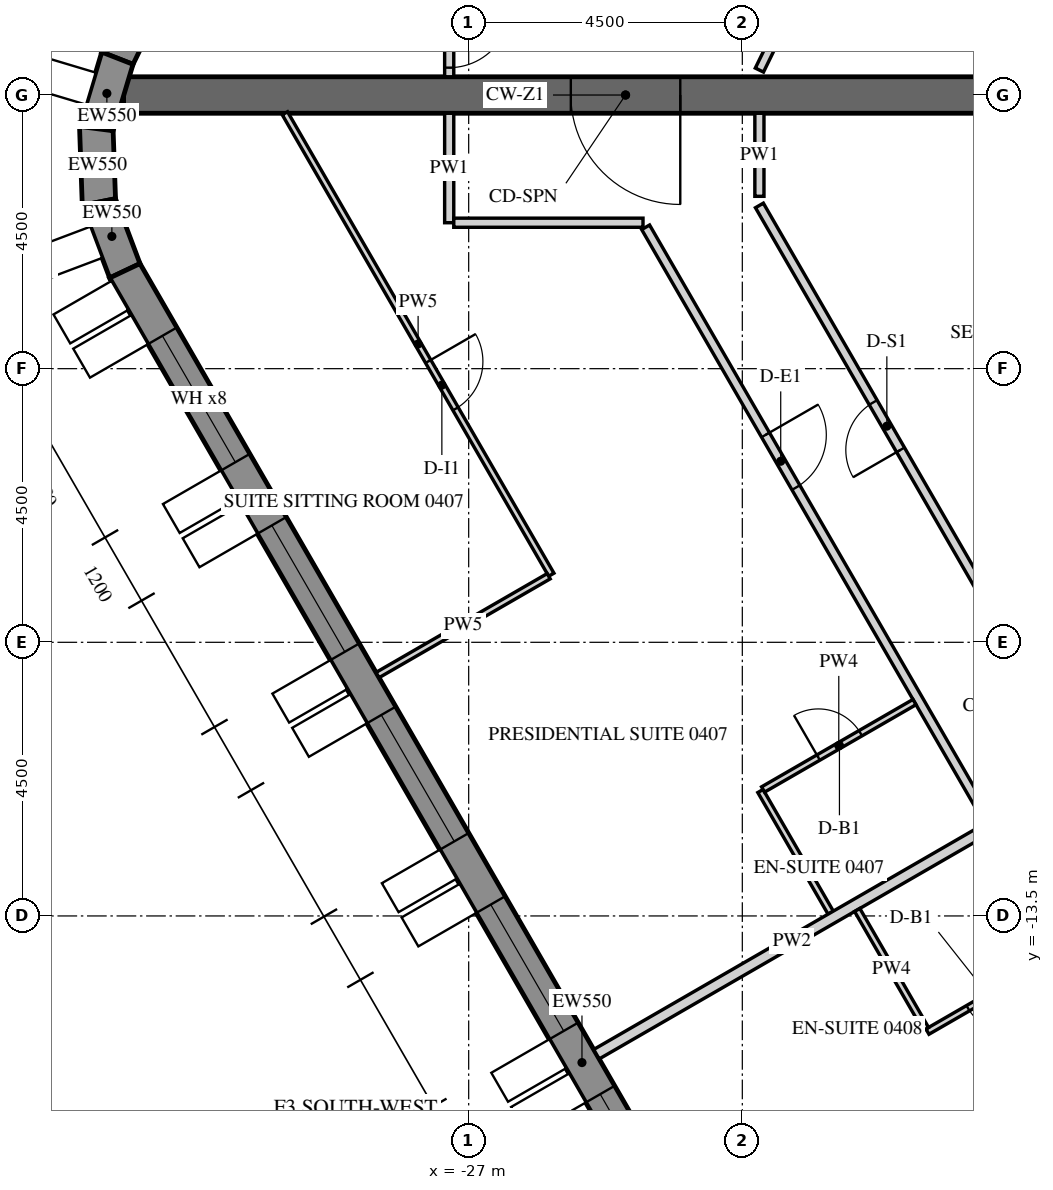
"""IFC4 building model, lengths in metres.
Left out: names, types, materials, properties, quantities, classifications, styles, units other than length and angle.
Written with IfcOpenShell. Run it as: python <this file> out.ifc"""

import sys

from ifc_helpers import new_model, si_unit, direction, frame, frame_2d, origin, place, context, subcontext, project, spatial, polyline, rectangle, outline, extrude, element, fill, save


model = new_model("IFC4")
c1 = context("Model", 3, precision=1e-05, world=origin(), true_north=direction((0.0, 1.0)))
c2 = subcontext(c1, "Body", "Model", "MODEL_VIEW")
j1 = project(units=[si_unit("LENGTHUNIT", "METRE"), si_unit("PLANEANGLEUNIT", "RADIAN")], contexts=[c1])
p1 = place(None, origin())
s1 = spatial("IfcSite", under=j1, at=p1, CompositionType="ELEMENT")
p2 = place(p1, origin())
s2 = spatial("IfcBuilding", under=s1, at=p2, CompositionType="ELEMENT")
p3 = place(p2, frame((0.0, 0.0, 68.7)))
s3 = spatial("IfcBuildingStorey", under=s2, at=p3, CompositionType="ELEMENT", Elevation=68.7)
p4 = place(p3, frame((-19.595, 27.633, -0.15), z_axis=(0.0, 0.0, 1.0), x_axis=(-0.438368285794, -0.898795441694, 0.0)))
e1 = element("IfcWall", 1, at=p4, inside=s3, PredefinedType="SOLIDWALL", context=c2, shape_type="SweptSolid", body=[
    extrude(outline(polyline([(-0.026, -0.275), (30.093, -0.275), (30.048, 0.275), (0.026, 0.275), (-0.026, -0.275)])), origin(), (0.0, 0.0, 1.0), 3.9),
])
p5 = place(p4, frame((1.236, 0.0, 1.05)))
e2 = element("IfcOpeningElement", 2, at=p5, cuts=e1, PredefinedType="OPENING", context=c2, shape_type="SweptSolid", body=[
    extrude(rectangle(XDim=2.4, YDim=2.4, at=frame_2d((1.2, 1.2))), frame((0.0, 0.285, 0.0), z_axis=(0.0, -1.0, 0.0), x_axis=(1.0, 0.0, 0.0)), (0.0, 0.0, 1.0), 0.57),
])
p6 = place(p4, frame((4.835, 0.0, 1.05)))
e3 = element("IfcOpeningElement", 3, at=p6, cuts=e1, PredefinedType="OPENING", context=c2, shape_type="SweptSolid", body=[
    extrude(rectangle(XDim=2.4, YDim=2.4, at=frame_2d((1.2, 1.2))), frame((0.0, 0.285, 0.0), z_axis=(0.0, -1.0, 0.0), x_axis=(1.0, 0.0, 0.0)), (0.0, 0.0, 1.0), 0.57),
])
p7 = place(p4, frame((8.436, 0.0, 1.05)))
e4 = element("IfcOpeningElement", 4, at=p7, cuts=e1, PredefinedType="OPENING", context=c2, shape_type="SweptSolid", body=[
    extrude(rectangle(XDim=2.4, YDim=2.4, at=frame_2d((1.2, 1.2))), frame((0.0, 0.285, 0.0), z_axis=(0.0, -1.0, 0.0), x_axis=(1.0, 0.0, 0.0)), (0.0, 0.0, 1.0), 0.57),
])
p8 = place(p4, frame((12.035, 0.0, 1.05)))
e5 = element("IfcOpeningElement", 5, at=p8, cuts=e1, PredefinedType="OPENING", context=c2, shape_type="SweptSolid", body=[
    extrude(rectangle(XDim=2.4, YDim=2.4, at=frame_2d((1.2, 1.2))), frame((0.0, 0.285, 0.0), z_axis=(0.0, -1.0, 0.0), x_axis=(1.0, 0.0, 0.0)), (0.0, 0.0, 1.0), 0.57),
])
p9 = place(p4, frame((15.635, 0.0, 1.05)))
e6 = element("IfcOpeningElement", 6, at=p9, cuts=e1, PredefinedType="OPENING", context=c2, shape_type="SweptSolid", body=[
    extrude(rectangle(XDim=2.4, YDim=2.4, at=frame_2d((1.2, 1.2))), frame((0.0, 0.285, 0.0), z_axis=(0.0, -1.0, 0.0), x_axis=(1.0, 0.0, 0.0)), (0.0, 0.0, 1.0), 0.57),
])
p10 = place(p4, frame((19.236, 0.0, 1.05)))
e7 = element("IfcOpeningElement", 7, at=p10, cuts=e1, PredefinedType="OPENING", context=c2, shape_type="SweptSolid", body=[
    extrude(rectangle(XDim=2.4, YDim=2.4, at=frame_2d((1.2, 1.2))), frame((0.0, 0.285, 0.0), z_axis=(0.0, -1.0, 0.0), x_axis=(1.0, 0.0, 0.0)), (0.0, 0.0, 1.0), 0.57),
])
p11 = place(p4, frame((22.835, 0.0, 1.05)))
e8 = element("IfcOpeningElement", 8, at=p11, cuts=e1, PredefinedType="OPENING", context=c2, shape_type="SweptSolid", body=[
    extrude(rectangle(XDim=2.4, YDim=2.4, at=frame_2d((1.2, 1.2))), frame((0.0, 0.285, 0.0), z_axis=(0.0, -1.0, 0.0), x_axis=(1.0, 0.0, 0.0)), (0.0, 0.0, 1.0), 0.57),
])
p12 = place(p4, frame((26.436, 0.0, 1.05)))
e9 = element("IfcOpeningElement", 9, at=p12, cuts=e1, PredefinedType="OPENING", context=c2, shape_type="SweptSolid", body=[
    extrude(rectangle(XDim=2.4, YDim=2.4, at=frame_2d((1.2, 1.2))), frame((0.0, 0.285, 0.0), z_axis=(0.0, -1.0, 0.0), x_axis=(1.0, 0.0, 0.0)), (0.0, 0.0, 1.0), 0.57),
])
p13 = place(p3, frame((-32.777, 0.605, -0.15), z_axis=(0.0, 0.0, 1.0), x_axis=(-0.286921497463, -0.957954098219, 0.0)))
e10 = element("IfcWall", 10, at=p13, inside=s3, PredefinedType="SOLIDWALL", context=c2, shape_type="SweptSolid", body=[
    extrude(outline(polyline([(-0.022, -0.275), (1.253, -0.275), (1.163, 0.275), (0.022, 0.275), (-0.022, -0.275)])), origin(), (0.0, 0.0, 1.0), 3.9),
])
p14 = place(p3, frame((-33.124, -0.552, -0.15), z_axis=(0.0, 0.0, 1.0), x_axis=(0.03495638276, -0.999388838893, 0.0)))
e11 = element("IfcWall", 11, at=p14, inside=s3, PredefinedType="SOLIDWALL", context=c2, shape_type="SweptSolid", body=[
    extrude(outline(polyline([(-0.045, -0.275), (1.253, -0.275), (1.163, 0.275), (0.045, 0.275), (-0.045, -0.275)])), origin(), (0.0, 0.0, 1.0), 3.9),
])
p15 = place(p3, frame((-33.081, -1.76, -0.15), z_axis=(0.0, 0.0, 1.0), x_axis=(0.353027214741, -0.935613053378, 0.0)))
e12 = element("IfcWall", 12, at=p15, inside=s3, PredefinedType="SOLIDWALL", context=c2, shape_type="SweptSolid", body=[
    extrude(outline(polyline([(-0.045, -0.275), (1.231, -0.275), (1.186, 0.275), (0.045, 0.275), (-0.045, -0.275)])), origin(), (0.0, 0.0, 1.0), 3.9),
])
p16 = place(p3, frame((-32.655, -2.89, -0.15), z_axis=(0.0, 0.0, 1.0), x_axis=(0.499997711317, -0.866026725152, 0.0)))
e13 = element("IfcWall", 13, at=p16, inside=s3, PredefinedType="SOLIDWALL", context=c2, shape_type="SweptSolid", body=[
    extrude(outline(polyline([(-0.022, -0.275), (30.097, -0.275), (30.045, 0.275), (0.022, 0.275), (-0.022, -0.275)])), origin(), (0.0, 0.0, 1.0), 3.9),
])
p17 = place(p16, frame((1.236, 0.0, 1.05)))
e14 = element("IfcOpeningElement", 14, at=p17, cuts=e13, PredefinedType="OPENING", context=c2, shape_type="SweptSolid", body=[
    extrude(rectangle(XDim=2.4, YDim=2.4, at=frame_2d((1.2, 1.2))), frame((0.0, 0.285, 0.0), z_axis=(0.0, -1.0, 0.0), x_axis=(1.0, 0.0, 0.0)), (0.0, 0.0, 1.0), 0.57),
])
p18 = place(p16, frame((4.835, 0.0, 1.05)))
e15 = element("IfcOpeningElement", 15, at=p18, cuts=e13, PredefinedType="OPENING", context=c2, shape_type="SweptSolid", body=[
    extrude(rectangle(XDim=2.4, YDim=2.4, at=frame_2d((1.2, 1.2))), frame((0.0, 0.285, 0.0), z_axis=(0.0, -1.0, 0.0), x_axis=(1.0, 0.0, 0.0)), (0.0, 0.0, 1.0), 0.57),
])
p19 = place(p16, frame((8.436, 0.0, 1.05)))
e16 = element("IfcOpeningElement", 16, at=p19, cuts=e13, PredefinedType="OPENING", context=c2, shape_type="SweptSolid", body=[
    extrude(rectangle(XDim=2.4, YDim=2.4, at=frame_2d((1.2, 1.2))), frame((0.0, 0.285, 0.0), z_axis=(0.0, -1.0, 0.0), x_axis=(1.0, 0.0, 0.0)), (0.0, 0.0, 1.0), 0.57),
])
p20 = place(p16, frame((12.035, 0.0, 1.05)))
e17 = element("IfcOpeningElement", 17, at=p20, cuts=e13, PredefinedType="OPENING", context=c2, shape_type="SweptSolid", body=[
    extrude(rectangle(XDim=2.4, YDim=2.4, at=frame_2d((1.2, 1.2))), frame((0.0, 0.285, 0.0), z_axis=(0.0, -1.0, 0.0), x_axis=(1.0, 0.0, 0.0)), (0.0, 0.0, 1.0), 0.57),
])
p21 = place(p16, frame((15.635, 0.0, 1.05)))
e18 = element("IfcOpeningElement", 18, at=p21, cuts=e13, PredefinedType="OPENING", context=c2, shape_type="SweptSolid", body=[
    extrude(rectangle(XDim=2.4, YDim=2.4, at=frame_2d((1.2, 1.2))), frame((0.0, 0.285, 0.0), z_axis=(0.0, -1.0, 0.0), x_axis=(1.0, 0.0, 0.0)), (0.0, 0.0, 1.0), 0.57),
])
p22 = place(p16, frame((19.236, 0.0, 1.05)))
e19 = element("IfcOpeningElement", 19, at=p22, cuts=e13, PredefinedType="OPENING", context=c2, shape_type="SweptSolid", body=[
    extrude(rectangle(XDim=2.4, YDim=2.4, at=frame_2d((1.2, 1.2))), frame((0.0, 0.285, 0.0), z_axis=(0.0, -1.0, 0.0), x_axis=(1.0, 0.0, 0.0)), (0.0, 0.0, 1.0), 0.57),
])
p23 = place(p16, frame((22.835, 0.0, 1.05)))
e20 = element("IfcOpeningElement", 20, at=p23, cuts=e13, PredefinedType="OPENING", context=c2, shape_type="SweptSolid", body=[
    extrude(rectangle(XDim=2.4, YDim=2.4, at=frame_2d((1.2, 1.2))), frame((0.0, 0.285, 0.0), z_axis=(0.0, -1.0, 0.0), x_axis=(1.0, 0.0, 0.0)), (0.0, 0.0, 1.0), 0.57),
])
p24 = place(p16, frame((26.436, 0.0, 1.05)))
e21 = element("IfcOpeningElement", 21, at=p24, cuts=e13, PredefinedType="OPENING", context=c2, shape_type="SweptSolid", body=[
    extrude(rectangle(XDim=2.4, YDim=2.4, at=frame_2d((1.2, 1.2))), frame((0.0, 0.285, 0.0), z_axis=(0.0, -1.0, 0.0), x_axis=(1.0, 0.0, 0.0)), (0.0, 0.0, 1.0), 0.57),
])
p25 = place(p3, frame((-16.166, 0.0, -0.15), z_axis=(0.0, 0.0, 1.0), x_axis=(-1.0, 0.0, 0.0)))
e22 = element("IfcWall", 22, at=p25, inside=s3, PredefinedType="SHEAR", context=c2, shape_type="SweptSolid", body=[
    extrude(rectangle(XDim=16.509, YDim=0.6, at=frame_2d((8.254, 0.0))), origin(), (0.0, 0.0, 1.0), 3.9),
])
p26 = place(p25, frame((7.354, 0.0, 0.15)))
e23 = element("IfcOpeningElement", 23, at=p26, cuts=e22, PredefinedType="OPENING", context=c2, shape_type="SweptSolid", body=[
    extrude(rectangle(XDim=1.8, YDim=2.4, at=frame_2d((0.9, 1.2))), frame((0.0, 0.31, 0.0), z_axis=(0.0, -1.0, 0.0), x_axis=(1.0, 0.0, 0.0)), (0.0, 0.0, 1.0), 0.62),
])
p27 = place(p3, frame((-27.32, 2.025, 0.0), z_axis=(0.0, 0.0, 1.0), x_axis=(0.0, -1.0, 0.0)))
e24 = element("IfcWall", 24, at=p27, inside=s3, PredefinedType="PARTITIONING", context=c2, shape_type="SweptSolid", body=[
    extrude(rectangle(XDim=1.725, YDim=0.15, at=frame_2d((0.862, 0.0))), origin(), (0.0, 0.0, 1.0), 2.988),
])
p28 = place(p27, frame((0.575, 0.0, 0.0)))
e25 = element("IfcOpeningElement", 25, at=p28, cuts=e24, PredefinedType="OPENING", context=c2, shape_type="SweptSolid", body=[
    extrude(rectangle(XDim=1.0, YDim=2.1, at=frame_2d((0.5, 1.05))), frame((0.0, 0.085, 0.0), z_axis=(0.0, -1.0, 0.0), x_axis=(1.0, 0.0, 0.0)), (0.0, 0.0, 1.0), 0.17),
])
p29 = place(p3, frame((-22.219, 0.41, 0.0), z_axis=(0.0, 0.0, 1.0), x_axis=(0.438391891827, 0.898783927972, 0.0)))
e26 = element("IfcWall", 26, at=p29, inside=s3, PredefinedType="PARTITIONING", context=c2, shape_type="SweptSolid", body=[
    extrude(rectangle(XDim=9.699, YDim=0.15, at=frame_2d((4.85, 0.0))), origin(), (0.0, 0.0, 1.0), 2.988),
])
p30 = place(p29, frame((4.4, 0.0, 0.0)))
e27 = element("IfcOpeningElement", 27, at=p30, cuts=e26, PredefinedType="OPENING", context=c2, shape_type="SweptSolid", body=[
    extrude(rectangle(XDim=0.9, YDim=2.1, at=frame_2d((0.45, 1.05))), frame((0.0, 0.085, 0.0), z_axis=(0.0, -1.0, 0.0), x_axis=(1.0, 0.0, 0.0)), (0.0, 0.0, 1.0), 0.17),
])
p31 = place(p3, frame((-27.32, -0.3, 0.0), z_axis=(0.0, 0.0, 1.0), x_axis=(0.0, -1.0, 0.0)))
e28 = element("IfcWall", 28, at=p31, inside=s3, PredefinedType="PARTITIONING", context=c2, shape_type="SweptSolid", body=[
    extrude(rectangle(XDim=1.8, YDim=0.15, at=frame_2d((0.9, 0.0))), origin(), (0.0, 0.0, 1.0), 2.988),
])
p32 = place(p3, frame((-27.245, -2.1, 0.0), z_axis=(0.0, 0.0, 1.0), x_axis=(1.0, 0.0, 0.0)))
e29 = element("IfcWall", 29, at=p32, inside=s3, PredefinedType="PARTITIONING", context=c2, shape_type="SweptSolid", body=[
    extrude(rectangle(XDim=3.112, YDim=0.15, at=frame_2d((1.556, 0.0))), origin(), (0.0, 0.0, 1.0), 2.988),
])
p33 = place(p3, frame((-24.09, -2.175, 0.0), z_axis=(0.0, 0.0, 1.0), x_axis=(0.499996832073, -0.86602723278, 0.0)))
e30 = element("IfcWall", 30, at=p33, inside=s3, PredefinedType="PARTITIONING", context=c2, shape_type="SweptSolid", body=[
    extrude(rectangle(XDim=23.877, YDim=0.15, at=frame_2d((11.938, 0.0))), origin(), (0.0, 0.0, 1.0), 2.988),
])
p34 = place(p33, frame((3.943, 0.0, 0.0)))
e31 = element("IfcOpeningElement", 31, at=p34, cuts=e30, PredefinedType="OPENING", context=c2, shape_type="SweptSolid", body=[
    extrude(rectangle(XDim=1.0, YDim=2.1, at=frame_2d((0.5, 1.05))), frame((0.0, 0.085, 0.0), z_axis=(0.0, -1.0, 0.0), x_axis=(1.0, 0.0, 0.0)), (0.0, 0.0, 1.0), 0.17),
])
p35 = place(p33, frame((15.672, 0.0, 0.0)))
e32 = element("IfcOpeningElement", 32, at=p35, cuts=e30, PredefinedType="OPENING", context=c2, shape_type="SweptSolid", body=[
    extrude(rectangle(XDim=1.0, YDim=2.1, at=frame_2d((0.5, 1.05))), frame((0.0, 0.085, 0.0), z_axis=(0.0, -1.0, 0.0), x_axis=(1.0, 0.0, 0.0)), (0.0, 0.0, 1.0), 0.17),
])
p36 = place(p33, frame((19.525, 0.0, 0.0)))
e33 = element("IfcOpeningElement", 33, at=p36, cuts=e30, PredefinedType="OPENING", context=c2, shape_type="SweptSolid", body=[
    extrude(rectangle(XDim=1.0, YDim=2.1, at=frame_2d((0.5, 1.05))), frame((0.0, 0.085, 0.0), z_axis=(0.0, -1.0, 0.0), x_axis=(1.0, 0.0, 0.0)), (0.0, 0.0, 1.0), 0.17),
])
p37 = place(p3, frame((-18.027, -9.076, 0.0), z_axis=(0.0, 0.0, 1.0), x_axis=(-0.500007318041, 0.86602117867, 0.0)))
e34 = element("IfcWall", 34, at=p37, inside=s3, PredefinedType="PARTITIONING", context=c2, shape_type="SweptSolid", body=[
    extrude(rectangle(XDim=8.383, YDim=0.15, at=frame_2d((4.191, 0.0))), origin(), (0.0, 0.0, 1.0), 2.988),
])
p38 = place(p37, frame((3.742, 0.0, 0.0)))
e35 = element("IfcOpeningElement", 35, at=p38, cuts=e34, PredefinedType="OPENING", context=c2, shape_type="SweptSolid", body=[
    extrude(rectangle(XDim=0.9, YDim=2.1, at=frame_2d((0.45, 1.05))), frame((0.0, 0.085, 0.0), z_axis=(0.0, -1.0, 0.0), x_axis=(1.0, 0.0, 0.0)), (0.0, 0.0, 1.0), 0.17),
])
p39 = place(p3, frame((-22.219, -1.666, 0.0), z_axis=(0.0, 0.0, 1.0), x_axis=(0.0, 1.0, 0.0)))
e36 = element("IfcWall", 36, at=p39, inside=s3, PredefinedType="PARTITIONING", context=c2, shape_type="SweptSolid", body=[
    extrude(rectangle(XDim=1.366, YDim=0.15, at=frame_2d((0.683, 0.0))), origin(), (0.0, 0.0, 1.0), 2.988),
])
p40 = place(p3, frame((-21.047, -13.446, 0.0), z_axis=(0.0, 0.0, 1.0), x_axis=(-0.500015210774, 0.866016621662, 0.0)))
e37 = element("IfcWall", 37, at=p40, inside=s3, PredefinedType="PARTITIONING", context=c2, shape_type="SweptSolid", body=[
    extrude(rectangle(XDim=2.31, YDim=0.1, at=frame_2d((1.155, 0.0))), origin(), (0.0, 0.0, 1.0), 2.988),
])
p41 = place(p3, frame((-22.158, -11.42, 0.0), z_axis=(0.0, 0.0, 1.0), x_axis=(0.866018712932, 0.500011588718, 0.0)))
e38 = element("IfcWall", 38, at=p41, inside=s3, PredefinedType="PARTITIONING", context=c2, shape_type="SweptSolid", body=[
    extrude(rectangle(XDim=2.875, YDim=0.1, at=frame_2d((1.438, 0.0))), origin(), (0.0, 0.0, 1.0), 2.988),
])
p42 = place(p41, frame((1.05, 0.0, 0.0)))
e39 = element("IfcOpeningElement", 39, at=p42, cuts=e38, PredefinedType="OPENING", context=c2, shape_type="SweptSolid", body=[
    extrude(rectangle(XDim=0.8, YDim=2.1, at=frame_2d((0.4, 1.05))), frame((0.0, 0.06, 0.0), z_axis=(0.0, -1.0, 0.0), x_axis=(1.0, 0.0, 0.0)), (0.0, 0.0, 1.0), 0.12),
])
p43 = place(p3, frame((-30.022, -0.3, 0.0), z_axis=(0.0, 0.0, 1.0), x_axis=(0.499995798296, -0.866027829626, 0.0)))
e40 = element("IfcWall", 40, at=p43, inside=s3, PredefinedType="PARTITIONING", context=c2, shape_type="SweptSolid", body=[
    extrude(rectangle(XDim=8.762, YDim=0.1, at=frame_2d((4.381, 0.0))), origin(), (0.0, 0.0, 1.0), 2.988),
])
p44 = place(p43, frame((4.712, 0.0, 0.0)))
e41 = element("IfcOpeningElement", 41, at=p44, cuts=e40, PredefinedType="OPENING", context=c2, shape_type="SweptSolid", body=[
    extrude(rectangle(XDim=0.9, YDim=2.1, at=frame_2d((0.45, 1.05))), frame((0.0, 0.06, 0.0), z_axis=(0.0, -1.0, 0.0), x_axis=(1.0, 0.0, 0.0)), (0.0, 0.0, 1.0), 0.12),
])
p45 = place(p3, frame((-25.684, -7.913, 0.0), z_axis=(0.0, 0.0, 1.0), x_axis=(-0.866034226713, -0.499984717929, 0.0)))
e42 = element("IfcWall", 42, at=p45, inside=s3, PredefinedType="PARTITIONING", context=c2, shape_type="SweptSolid", body=[
    extrude(rectangle(XDim=3.25, YDim=0.1, at=frame_2d((1.625, 0.0))), origin(), (0.0, 0.0, 1.0), 2.988),
])
p46 = place(p3, frame((-24.899, -15.774, 0.0), z_axis=(0.0, 0.0, 1.0), x_axis=(0.866028983062, 0.499993800457, 0.0)))
e43 = element("IfcWall", 43, at=p46, inside=s3, PredefinedType="PARTITIONING", context=c2, shape_type="SweptSolid", body=[
    extrude(rectangle(XDim=7.425, YDim=0.18, at=frame_2d((3.712, 0.0))), origin(), (0.0, 0.0, 1.0), 2.988),
])
p47 = place(p3, frame((-17.269, -14.14, 0.0), z_axis=(0.0, 0.0, 1.0), x_axis=(-0.865973021571, -0.500090717682, 0.0)))
e44 = element("IfcWall", 44, at=p47, inside=s3, PredefinedType="PARTITIONING", context=c2, shape_type="SweptSolid", body=[
    extrude(rectangle(XDim=2.525, YDim=0.1, at=frame_2d((1.262, 0.0))), origin(), (0.0, 0.0, 1.0), 2.988),
])
p48 = place(p47, frame((0.955, 0.0, 0.0)))
e45 = element("IfcOpeningElement", 45, at=p48, cuts=e44, PredefinedType="OPENING", context=c2, shape_type="SweptSolid", body=[
    extrude(rectangle(XDim=0.8, YDim=2.1, at=frame_2d((0.4, 1.05))), frame((0.0, 0.06, 0.0), z_axis=(0.0, -1.0, 0.0), x_axis=(1.0, 0.0, 0.0)), (0.0, 0.0, 1.0), 0.12),
])
p49 = place(p3, frame((-19.48, -15.359, 0.0), z_axis=(0.0, 0.0, 1.0), x_axis=(-0.4999967785, 0.866027263711, 0.0)))
e46 = element("IfcWall", 46, at=p49, inside=s3, PredefinedType="PARTITIONING", context=c2, shape_type="SweptSolid", body=[
    extrude(rectangle(XDim=2.26, YDim=0.1, at=frame_2d((1.13, 0.0))), origin(), (0.0, 0.0, 1.0), 2.988),
])
p50 = place(p17, frame((0.0, 0.205, 0.0)))
e47 = element("IfcWindow", 47, at=p50, inside=s3, PartitioningType="DOUBLE_PANEL_VERTICAL", PredefinedType="WINDOW", context=c2, shape_type="SweptSolid", body=[
    extrude(rectangle(XDim=2.4, YDim=2.4, at=frame_2d((1.2, 1.2))), frame((0.0, 0.03, 0.0), z_axis=(0.0, -1.0, 0.0), x_axis=(1.0, 0.0, 0.0)), (0.0, 0.0, 1.0), 0.06),
])
fill(e14, e47)
p51 = place(p18, frame((0.0, 0.205, 0.0)))
e48 = element("IfcWindow", 48, at=p51, inside=s3, PartitioningType="DOUBLE_PANEL_VERTICAL", PredefinedType="WINDOW", context=c2, shape_type="SweptSolid", body=[
    extrude(rectangle(XDim=2.4, YDim=2.4, at=frame_2d((1.2, 1.2))), frame((0.0, 0.03, 0.0), z_axis=(0.0, -1.0, 0.0), x_axis=(1.0, 0.0, 0.0)), (0.0, 0.0, 1.0), 0.06),
])
fill(e15, e48)
p52 = place(p19, frame((0.0, 0.205, 0.0)))
e49 = element("IfcWindow", 49, at=p52, inside=s3, PartitioningType="DOUBLE_PANEL_VERTICAL", PredefinedType="WINDOW", context=c2, shape_type="SweptSolid", body=[
    extrude(rectangle(XDim=2.4, YDim=2.4, at=frame_2d((1.2, 1.2))), frame((0.0, 0.03, 0.0), z_axis=(0.0, -1.0, 0.0), x_axis=(1.0, 0.0, 0.0)), (0.0, 0.0, 1.0), 0.06),
])
fill(e16, e49)
p53 = place(p20, frame((0.0, 0.205, 0.0)))
e50 = element("IfcWindow", 50, at=p53, inside=s3, PartitioningType="DOUBLE_PANEL_VERTICAL", PredefinedType="WINDOW", context=c2, shape_type="SweptSolid", body=[
    extrude(rectangle(XDim=2.4, YDim=2.4, at=frame_2d((1.2, 1.2))), frame((0.0, 0.03, 0.0), z_axis=(0.0, -1.0, 0.0), x_axis=(1.0, 0.0, 0.0)), (0.0, 0.0, 1.0), 0.06),
])
fill(e17, e50)
p54 = place(p21, frame((0.0, 0.205, 0.0)))
e51 = element("IfcWindow", 51, at=p54, inside=s3, PartitioningType="DOUBLE_PANEL_VERTICAL", PredefinedType="WINDOW", context=c2, shape_type="SweptSolid", body=[
    extrude(rectangle(XDim=2.4, YDim=2.4, at=frame_2d((1.2, 1.2))), frame((0.0, 0.03, 0.0), z_axis=(0.0, -1.0, 0.0), x_axis=(1.0, 0.0, 0.0)), (0.0, 0.0, 1.0), 0.06),
])
fill(e18, e51)
p55 = place(p26, origin())
e52 = element("IfcDoor", 52, at=p55, inside=s3, OperationType="DOUBLE_DOOR_SINGLE_SWING", PredefinedType="DOOR", context=c2, shape_type="SweptSolid", body=[
    extrude(rectangle(XDim=1.8, YDim=2.4, at=frame_2d((0.9, 1.2))), frame((0.0, 0.025, 0.0), z_axis=(0.0, -1.0, 0.0), x_axis=(1.0, 0.0, 0.0)), (0.0, 0.0, 1.0), 0.05),
])
fill(e23, e52)
p56 = place(p28, origin())
e53 = element("IfcDoor", 53, at=p56, inside=s3, OperationType="SINGLE_SWING_LEFT", PredefinedType="DOOR", context=c2, shape_type="SweptSolid", body=[
    extrude(rectangle(XDim=1.0, YDim=2.1, at=frame_2d((0.5, 1.05))), frame((0.0, 0.025, 0.0), z_axis=(0.0, -1.0, 0.0), x_axis=(1.0, 0.0, 0.0)), (0.0, 0.0, 1.0), 0.05),
])
fill(e25, e53)
p57 = place(p34, origin())
e54 = element("IfcDoor", 54, at=p57, inside=s3, OperationType="SINGLE_SWING_RIGHT", PredefinedType="DOOR", context=c2, shape_type="SweptSolid", body=[
    extrude(rectangle(XDim=1.0, YDim=2.1, at=frame_2d((0.5, 1.05))), frame((0.0, 0.025, 0.0), z_axis=(0.0, -1.0, 0.0), x_axis=(1.0, 0.0, 0.0)), (0.0, 0.0, 1.0), 0.05),
])
fill(e31, e54)
p58 = place(p42, origin())
e55 = element("IfcDoor", 55, at=p58, inside=s3, OperationType="SINGLE_SWING_LEFT", PredefinedType="DOOR", context=c2, shape_type="SweptSolid", body=[
    extrude(rectangle(XDim=0.8, YDim=2.1, at=frame_2d((0.4, 1.05))), frame((0.0, 0.025, 0.0), z_axis=(0.0, -1.0, 0.0), x_axis=(1.0, 0.0, 0.0)), (0.0, 0.0, 1.0), 0.05),
])
fill(e39, e55)
p59 = place(p44, origin())
e56 = element("IfcDoor", 56, at=p59, inside=s3, OperationType="SINGLE_SWING_LEFT", PredefinedType="DOOR", context=c2, shape_type="SweptSolid", body=[
    extrude(rectangle(XDim=0.9, YDim=2.1, at=frame_2d((0.45, 1.05))), frame((0.0, 0.025, 0.0), z_axis=(0.0, -1.0, 0.0), x_axis=(1.0, 0.0, 0.0)), (0.0, 0.0, 1.0), 0.05),
])
fill(e41, e56)
p60 = place(p48, origin())
e57 = element("IfcDoor", 57, at=p60, inside=s3, OperationType="SINGLE_SWING_LEFT", PredefinedType="DOOR", context=c2, shape_type="SweptSolid", body=[
    extrude(rectangle(XDim=0.8, YDim=2.1, at=frame_2d((0.4, 1.05))), frame((0.0, 0.025, 0.0), z_axis=(0.0, -1.0, 0.0), x_axis=(1.0, 0.0, 0.0)), (0.0, 0.0, 1.0), 0.05),
])
fill(e45, e57)
p61 = place(p38, origin())
e58 = element("IfcDoor", 58, at=p61, inside=s3, OperationType="SINGLE_SWING_RIGHT", PredefinedType="DOOR", context=c2, shape_type="SweptSolid", body=[
    extrude(rectangle(XDim=0.9, YDim=2.1, at=frame_2d((0.45, 1.05))), frame((0.0, 0.025, 0.0), z_axis=(0.0, -1.0, 0.0), x_axis=(1.0, 0.0, 0.0)), (0.0, 0.0, 1.0), 0.05),
])
fill(e35, e58)
save(model, sys.argv[1])
